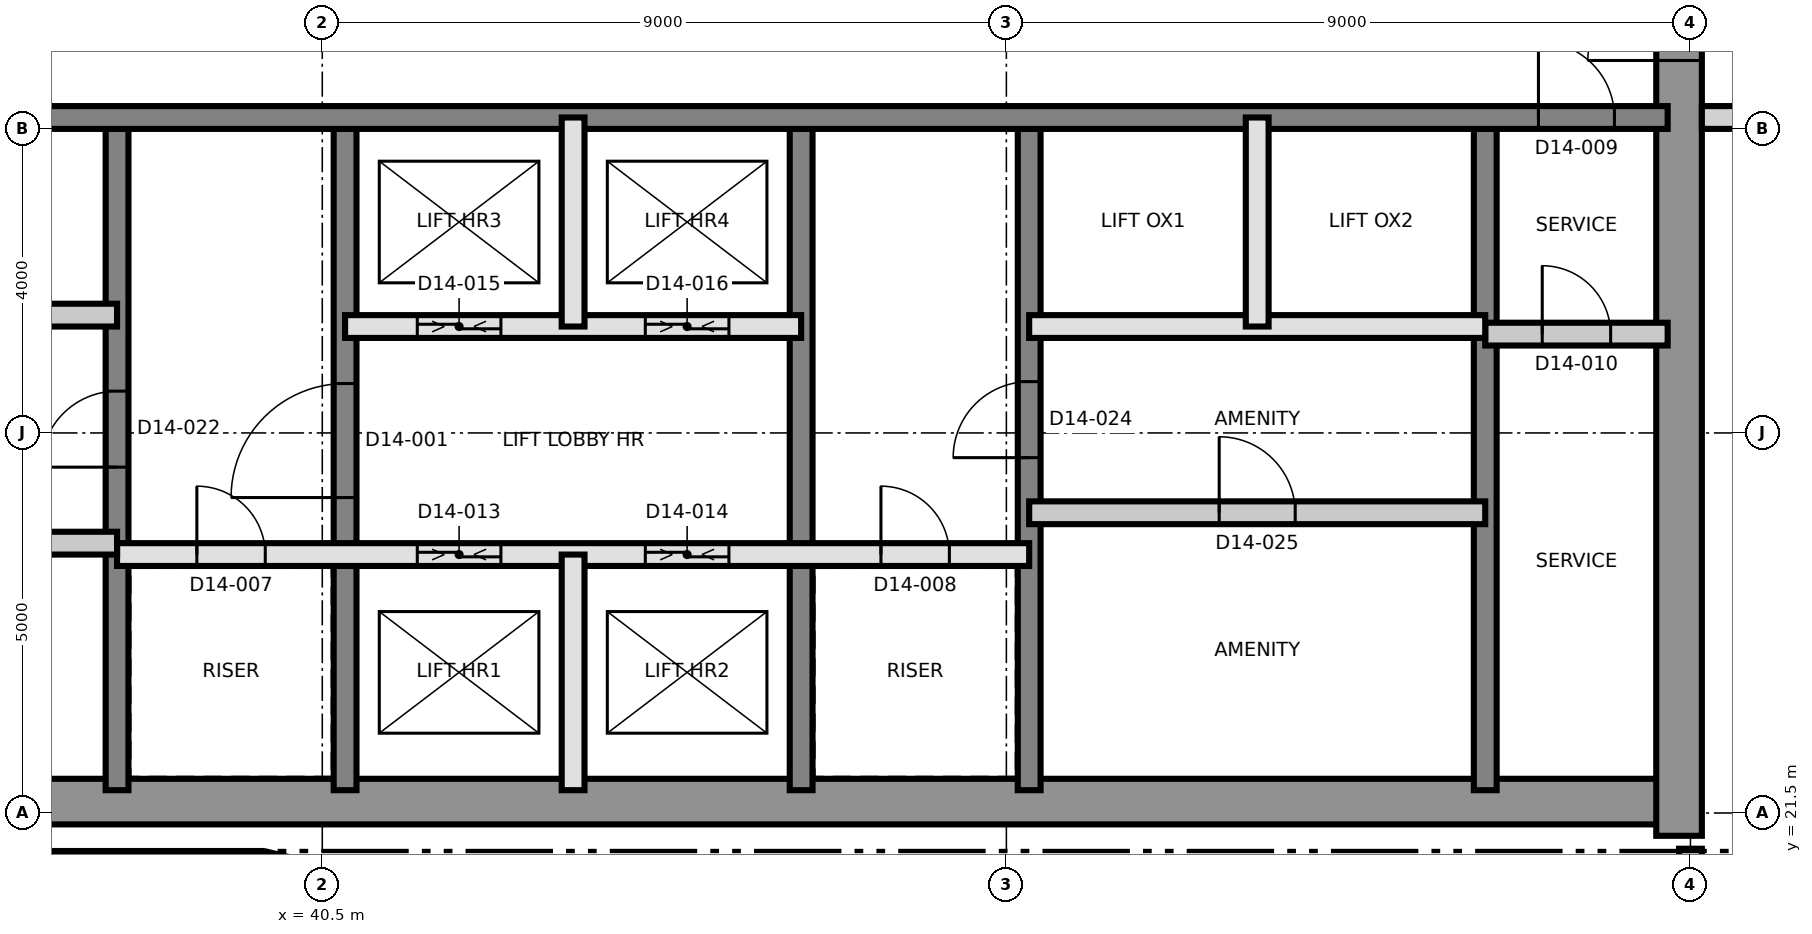
"""IFC4 building model, lengths in metres.
Left out: names, types, materials, properties, quantities, classifications, styles, units other than length and angle.
Written with IfcOpenShell. Run it as: python <this file> out.ifc"""

import sys

from ifc_helpers import new_model, si_unit, direction, frame, frame_2d, origin, place, context, subcontext, project, spatial, rectangle, extrude, element, fill, save


model = new_model("IFC4")
c1 = context("Model", 3, precision=1e-05, world=origin(), true_north=direction((0.0, 1.0)))
c2 = subcontext(c1, "Body", "Model", "MODEL_VIEW")
j1 = project(units=[si_unit("LENGTHUNIT", "METRE"), si_unit("PLANEANGLEUNIT", "RADIAN")], contexts=[c1])
p1 = place(None, origin())
s1 = spatial("IfcSite", under=j1, at=p1, CompositionType="ELEMENT")
p2 = place(p1, origin())
s2 = spatial("IfcBuilding", under=s1, at=p2, CompositionType="ELEMENT")
p3 = place(p2, frame((0.0, 0.0, 149.6)))
s3 = spatial("IfcBuildingStorey", under=s2, at=p3, CompositionType="ELEMENT", Elevation=149.6)
p4 = place(p3, frame((31.2, 21.65, 0.0), z_axis=(0.0, 0.0, 1.0), x_axis=(1.0, 0.0, 0.0)))
e1 = element("IfcWall", 1, at=p4, inside=s3, PredefinedType="SHEAR", context=c2, shape_type="SweptSolid", body=[
    extrude(rectangle(XDim=27.0, YDim=0.6, at=frame_2d((13.5, 0.0))), origin(), (0.0, 0.0, 1.0), 3.7),
])
p5 = place(p3, frame((58.35, 21.2, 0.0), z_axis=(0.0, 0.0, 1.0), x_axis=(0.0, 1.0, 0.0)))
e2 = element("IfcWall", 2, at=p5, inside=s3, PredefinedType="SHEAR", context=c2, shape_type="SweptSolid", body=[
    extrude(rectangle(XDim=18.6, YDim=0.6, at=frame_2d((9.3, 0.0))), origin(), (0.0, 0.0, 1.0), 3.7),
])
p6 = place(p5, frame((10.2, 0.0, 0.0)))
e3 = element("IfcOpeningElement", 3, at=p6, cuts=e2, PredefinedType="OPENING", context=c2, shape_type="SweptSolid", body=[
    extrude(rectangle(XDim=1.2, YDim=2.1, at=frame_2d((0.6, 1.05))), frame((0.0, 0.31, 0.0), z_axis=(0.0, -1.0, 0.0), x_axis=(1.0, 0.0, 0.0)), (0.0, 0.0, 1.0), 0.62),
])
p7 = place(p3, frame((37.8, 21.8, 0.0), z_axis=(0.0, 0.0, 1.0), x_axis=(0.0, 1.0, 0.0)))
e4 = element("IfcWall", 4, at=p7, inside=s3, PredefinedType="SHEAR", context=c2, shape_type="SweptSolid", body=[
    extrude(rectangle(XDim=8.7, YDim=0.3, at=frame_2d((4.35, 0.0))), origin(), (0.0, 0.0, 1.0), 3.7),
])
p8 = place(p7, frame((4.25, 0.0, 0.0)))
e5 = element("IfcOpeningElement", 5, at=p8, cuts=e4, PredefinedType="OPENING", context=c2, shape_type="SweptSolid", body=[
    extrude(rectangle(XDim=1.0, YDim=2.1, at=frame_2d((0.5, 1.05))), frame((0.0, 0.16, 0.0), z_axis=(0.0, -1.0, 0.0), x_axis=(1.0, 0.0, 0.0)), (0.0, 0.0, 1.0), 0.32),
])
p9 = place(p3, frame((40.8, 21.8, 0.0), z_axis=(0.0, 0.0, 1.0), x_axis=(0.0, 1.0, 0.0)))
e6 = element("IfcWall", 6, at=p9, inside=s3, PredefinedType="SHEAR", context=c2, shape_type="SweptSolid", body=[
    extrude(rectangle(XDim=8.7, YDim=0.3, at=frame_2d((4.35, 0.0))), origin(), (0.0, 0.0, 1.0), 3.7),
])
p10 = place(p9, frame((3.85, 0.0, 0.0)))
e7 = element("IfcOpeningElement", 7, at=p10, cuts=e6, PredefinedType="OPENING", context=c2, shape_type="SweptSolid", body=[
    extrude(rectangle(XDim=1.5, YDim=2.1, at=frame_2d((0.75, 1.05))), frame((0.0, 0.16, 0.0), z_axis=(0.0, -1.0, 0.0), x_axis=(1.0, 0.0, 0.0)), (0.0, 0.0, 1.0), 0.32),
])
p11 = place(p3, frame((46.8, 21.8, 0.0), z_axis=(0.0, 0.0, 1.0), x_axis=(0.0, 1.0, 0.0)))
e8 = element("IfcWall", 8, at=p11, inside=s3, PredefinedType="SHEAR", context=c2, shape_type="SweptSolid", body=[
    extrude(rectangle(XDim=8.7, YDim=0.3, at=frame_2d((4.35, 0.0))), origin(), (0.0, 0.0, 1.0), 3.7),
])
p12 = place(p3, frame((49.8, 21.8, 0.0), z_axis=(0.0, 0.0, 1.0), x_axis=(0.0, 1.0, 0.0)))
e9 = element("IfcWall", 9, at=p12, inside=s3, PredefinedType="SHEAR", context=c2, shape_type="SweptSolid", body=[
    extrude(rectangle(XDim=8.7, YDim=0.3, at=frame_2d((4.35, 0.0))), origin(), (0.0, 0.0, 1.0), 3.7),
])
p13 = place(p12, frame((4.375, 0.0, 0.0)))
e10 = element("IfcOpeningElement", 10, at=p13, cuts=e9, PredefinedType="OPENING", context=c2, shape_type="SweptSolid", body=[
    extrude(rectangle(XDim=1.0, YDim=2.1, at=frame_2d((0.5, 1.05))), frame((0.0, 0.16, 0.0), z_axis=(0.0, -1.0, 0.0), x_axis=(1.0, 0.0, 0.0)), (0.0, 0.0, 1.0), 0.32),
])
p14 = place(p3, frame((55.8, 21.8, 0.0), z_axis=(0.0, 0.0, 1.0), x_axis=(0.0, 1.0, 0.0)))
e11 = element("IfcWall", 11, at=p14, inside=s3, PredefinedType="SHEAR", context=c2, shape_type="SweptSolid", body=[
    extrude(rectangle(XDim=8.7, YDim=0.3, at=frame_2d((4.35, 0.0))), origin(), (0.0, 0.0, 1.0), 3.7),
])
p15 = place(p3, frame((31.8, 30.65, 0.0), z_axis=(0.0, 0.0, 1.0), x_axis=(1.0, 0.0, 0.0)))
e12 = element("IfcWall", 12, at=p15, inside=s3, PredefinedType="SHEAR", context=c2, shape_type="SweptSolid", body=[
    extrude(rectangle(XDim=26.4, YDim=0.3, at=frame_2d((13.2, 0.0))), origin(), (0.0, 0.0, 1.0), 3.7),
])
p16 = place(p15, frame((24.7, 0.0, 0.0)))
e13 = element("IfcOpeningElement", 13, at=p16, cuts=e12, PredefinedType="OPENING", context=c2, shape_type="SweptSolid", body=[
    extrude(rectangle(XDim=1.0, YDim=2.1, at=frame_2d((0.5, 1.05))), frame((0.0, 0.16, 0.0), z_axis=(0.0, -1.0, 0.0), x_axis=(1.0, 0.0, 0.0)), (0.0, 0.0, 1.0), 0.32),
])
p17 = place(p15, frame((4.0, 0.0, 0.0)))
e14 = element("IfcOpeningElement", 14, at=p17, cuts=e12, PredefinedType="OPENING", context=c2, shape_type="SweptSolid", body=[
    extrude(rectangle(XDim=1.0, YDim=2.1, at=frame_2d((0.5, 1.05))), frame((0.0, 0.16, 0.0), z_axis=(0.0, -1.0, 0.0), x_axis=(1.0, 0.0, 0.0)), (0.0, 0.0, 1.0), 0.32),
])
p18 = place(p3, frame((31.36, 20.85, 0.0), z_axis=(0.0, 0.0, 1.0), x_axis=(1.0, 0.0, 0.0)))
e15 = element("IfcWall", 15, at=p18, inside=s3, PredefinedType="SOLIDWALL", context=c2, shape_type="SweptSolid", body=[
    extrude(rectangle(XDim=8.34, YDim=0.3, at=frame_2d((4.17, 0.0))), origin(), (0.0, 0.0, 1.0), 3.4),
])
p19 = place(p3, frame((39.735, 20.846, 0.0), z_axis=(0.0, 0.0, 1.0), x_axis=(0.97206095595, -0.234728562212, 0.0)))
e16 = element("IfcWall", 16, at=p19, inside=s3, PredefinedType="SOLIDWALL", context=c2, shape_type="SweptSolid", body=[
    extrude(rectangle(XDim=2.35, YDim=0.3, at=frame_2d((1.175, 0.0))), origin(), (0.0, 0.0, 1.0), 3.4),
])
p20 = place(p3, frame((37.8, 24.9, 0.0), z_axis=(0.0, 0.0, 1.0), x_axis=(1.0, 0.0, 0.0)))
e17 = element("IfcWall", 17, at=p20, inside=s3, PredefinedType="SOLIDWALL", context=c2, shape_type="SweptSolid", body=[
    extrude(rectangle(XDim=12.0, YDim=0.3, at=frame_2d((6.0, 0.0))), origin(), (0.0, 0.0, 1.0), 3.4),
])
p21 = place(p20, frame((1.05, 0.0, 0.0)))
e18 = element("IfcOpeningElement", 18, at=p21, cuts=e17, PredefinedType="OPENING", context=c2, shape_type="SweptSolid", body=[
    extrude(rectangle(XDim=0.9, YDim=2.1, at=frame_2d((0.45, 1.05))), frame((0.0, 0.16, 0.0), z_axis=(0.0, -1.0, 0.0), x_axis=(1.0, 0.0, 0.0)), (0.0, 0.0, 1.0), 0.32),
])
p22 = place(p20, frame((10.05, 0.0, 0.0)))
e19 = element("IfcOpeningElement", 19, at=p22, cuts=e17, PredefinedType="OPENING", context=c2, shape_type="SweptSolid", body=[
    extrude(rectangle(XDim=0.9, YDim=2.1, at=frame_2d((0.45, 1.05))), frame((0.0, 0.16, 0.0), z_axis=(0.0, -1.0, 0.0), x_axis=(1.0, 0.0, 0.0)), (0.0, 0.0, 1.0), 0.32),
])
p23 = place(p20, frame((3.95, 0.0, 0.0)))
e20 = element("IfcOpeningElement", 20, at=p23, cuts=e17, PredefinedType="OPENING", context=c2, shape_type="SweptSolid", body=[
    extrude(rectangle(XDim=1.1, YDim=2.4, at=frame_2d((0.55, 1.2))), frame((0.0, 0.16, 0.0), z_axis=(0.0, -1.0, 0.0), x_axis=(1.0, 0.0, 0.0)), (0.0, 0.0, 1.0), 0.32),
])
p24 = place(p20, frame((6.95, 0.0, 0.0)))
e21 = element("IfcOpeningElement", 21, at=p24, cuts=e17, PredefinedType="OPENING", context=c2, shape_type="SweptSolid", body=[
    extrude(rectangle(XDim=1.1, YDim=2.4, at=frame_2d((0.55, 1.2))), frame((0.0, 0.16, 0.0), z_axis=(0.0, -1.0, 0.0), x_axis=(1.0, 0.0, 0.0)), (0.0, 0.0, 1.0), 0.32),
])
p25 = place(p3, frame((31.8, 25.05, 0.0), z_axis=(0.0, 0.0, 1.0), x_axis=(1.0, 0.0, 0.0)))
e22 = element("IfcWall", 22, at=p25, inside=s3, PredefinedType="PARTITIONING", context=c2, shape_type="SweptSolid", body=[
    extrude(rectangle(XDim=6.0, YDim=0.3, at=frame_2d((3.0, 0.0))), origin(), (0.0, 0.0, 1.0), 3.4),
])
p26 = place(p25, frame((2.5, 0.0, 0.0)))
e23 = element("IfcOpeningElement", 23, at=p26, cuts=e22, PredefinedType="OPENING", context=c2, shape_type="SweptSolid", body=[
    extrude(rectangle(XDim=1.0, YDim=2.1, at=frame_2d((0.5, 1.05))), frame((0.0, 0.16, 0.0), z_axis=(0.0, -1.0, 0.0), x_axis=(1.0, 0.0, 0.0)), (0.0, 0.0, 1.0), 0.32),
])
p27 = place(p3, frame((49.8, 25.45, 0.0), z_axis=(0.0, 0.0, 1.0), x_axis=(1.0, 0.0, 0.0)))
e24 = element("IfcWall", 24, at=p27, inside=s3, PredefinedType="PARTITIONING", context=c2, shape_type="SweptSolid", body=[
    extrude(rectangle(XDim=6.0, YDim=0.3, at=frame_2d((3.0, 0.0))), origin(), (0.0, 0.0, 1.0), 3.4),
])
p28 = place(p27, frame((2.5, 0.0, 0.0)))
e25 = element("IfcOpeningElement", 25, at=p28, cuts=e24, PredefinedType="OPENING", context=c2, shape_type="SweptSolid", body=[
    extrude(rectangle(XDim=1.0, YDim=2.1, at=frame_2d((0.5, 1.05))), frame((0.0, 0.16, 0.0), z_axis=(0.0, -1.0, 0.0), x_axis=(1.0, 0.0, 0.0)), (0.0, 0.0, 1.0), 0.32),
])
p29 = place(p3, frame((55.8, 27.8, 0.0), z_axis=(0.0, 0.0, 1.0), x_axis=(1.0, 0.0, 0.0)))
e26 = element("IfcWall", 26, at=p29, inside=s3, PredefinedType="PARTITIONING", context=c2, shape_type="SweptSolid", body=[
    extrude(rectangle(XDim=2.4, YDim=0.3, at=frame_2d((1.2, 0.0))), origin(), (0.0, 0.0, 1.0), 3.4),
])
p30 = place(p29, frame((0.75, 0.0, 0.0)))
e27 = element("IfcOpeningElement", 27, at=p30, cuts=e26, PredefinedType="OPENING", context=c2, shape_type="SweptSolid", body=[
    extrude(rectangle(XDim=0.9, YDim=2.1, at=frame_2d((0.45, 1.05))), frame((0.0, 0.16, 0.0), z_axis=(0.0, -1.0, 0.0), x_axis=(1.0, 0.0, 0.0)), (0.0, 0.0, 1.0), 0.32),
])
p31 = place(p3, frame((40.8, 27.9, 0.0), z_axis=(0.0, 0.0, 1.0), x_axis=(1.0, 0.0, 0.0)))
e28 = element("IfcWall", 28, at=p31, inside=s3, PredefinedType="SOLIDWALL", context=c2, shape_type="SweptSolid", body=[
    extrude(rectangle(XDim=6.0, YDim=0.3, at=frame_2d((3.0, 0.0))), origin(), (0.0, 0.0, 1.0), 3.4),
])
p32 = place(p31, frame((0.95, 0.0, 0.0)))
e29 = element("IfcOpeningElement", 29, at=p32, cuts=e28, PredefinedType="OPENING", context=c2, shape_type="SweptSolid", body=[
    extrude(rectangle(XDim=1.1, YDim=2.4, at=frame_2d((0.55, 1.2))), frame((0.0, 0.16, 0.0), z_axis=(0.0, -1.0, 0.0), x_axis=(1.0, 0.0, 0.0)), (0.0, 0.0, 1.0), 0.32),
])
p33 = place(p31, frame((3.95, 0.0, 0.0)))
e30 = element("IfcOpeningElement", 30, at=p33, cuts=e28, PredefinedType="OPENING", context=c2, shape_type="SweptSolid", body=[
    extrude(rectangle(XDim=1.1, YDim=2.4, at=frame_2d((0.55, 1.2))), frame((0.0, 0.16, 0.0), z_axis=(0.0, -1.0, 0.0), x_axis=(1.0, 0.0, 0.0)), (0.0, 0.0, 1.0), 0.32),
])
p34 = place(p3, frame((49.8, 27.9, 0.0), z_axis=(0.0, 0.0, 1.0), x_axis=(1.0, 0.0, 0.0)))
e31 = element("IfcWall", 31, at=p34, inside=s3, PredefinedType="SOLIDWALL", context=c2, shape_type="SweptSolid", body=[
    extrude(rectangle(XDim=6.0, YDim=0.3, at=frame_2d((3.0, 0.0))), origin(), (0.0, 0.0, 1.0), 3.4),
])
p35 = place(p3, frame((31.8, 28.05, 0.0), z_axis=(0.0, 0.0, 1.0), x_axis=(1.0, 0.0, 0.0)))
e32 = element("IfcWall", 32, at=p35, inside=s3, PredefinedType="PARTITIONING", context=c2, shape_type="SweptSolid", body=[
    extrude(rectangle(XDim=6.0, YDim=0.3, at=frame_2d((3.0, 0.0))), origin(), (0.0, 0.0, 1.0), 3.4),
])
p36 = place(p3, frame((43.8, 21.8, 0.0), z_axis=(0.0, 0.0, 1.0), x_axis=(0.0, 1.0, 0.0)))
e33 = element("IfcWall", 33, at=p36, inside=s3, PredefinedType="SOLIDWALL", context=c2, shape_type="SweptSolid", body=[
    extrude(rectangle(XDim=3.1, YDim=0.3, at=frame_2d((1.55, 0.0))), origin(), (0.0, 0.0, 1.0), 3.4),
])
for number, where, z_axis, x_axis in (
    (34, (43.8, 27.9, 0.0), (0.0, 0.0, 1.0), (0.0, 1.0, 0.0)),
    (35, (52.8, 27.9, 0.0), (0.0, 0.0, 1.0), (0.0, 1.0, 0.0)),
):
    element("IfcWall", number, at=place(p3, frame(where, z_axis=z_axis, x_axis=x_axis)), inside=s3, PredefinedType="SOLIDWALL", context=c2, shape_type="SweptSolid", body=[
        extrude(rectangle(XDim=2.75, YDim=0.3, at=frame_2d((1.375, 0.0))), origin(), (0.0, 0.0, 1.0), 3.4),
    ])
p37 = place(p3, frame((58.65, 30.65, 0.0), z_axis=(0.0, 0.0, 1.0), x_axis=(1.0, 0.0, 0.0)))
e36 = element("IfcWall", 36, at=p37, inside=s3, PredefinedType="PARTITIONING", context=c2, shape_type="SweptSolid", body=[
    extrude(rectangle(XDim=8.5, YDim=0.3, at=frame_2d((4.25, 0.0))), origin(), (0.0, 0.0, 1.0), 3.4),
])
p38 = place(p37, frame((0.8, 0.0, 0.0)))
e37 = element("IfcOpeningElement", 37, at=p38, cuts=e36, PredefinedType="OPENING", context=c2, shape_type="SweptSolid", body=[
    extrude(rectangle(XDim=1.0, YDim=2.1, at=frame_2d((0.5, 1.05))), frame((0.0, 0.16, 0.0), z_axis=(0.0, -1.0, 0.0), x_axis=(1.0, 0.0, 0.0)), (0.0, 0.0, 1.0), 0.32),
])
p39 = place(p37, frame((6.45, 0.0, 0.0)))
e38 = element("IfcOpeningElement", 38, at=p39, cuts=e36, PredefinedType="OPENING", context=c2, shape_type="SweptSolid", body=[
    extrude(rectangle(XDim=1.0, YDim=2.1, at=frame_2d((0.5, 1.05))), frame((0.0, 0.16, 0.0), z_axis=(0.0, -1.0, 0.0), x_axis=(1.0, 0.0, 0.0)), (0.0, 0.0, 1.0), 0.32),
])
p40 = place(p3, frame((58.5, 20.35, 0.0), z_axis=(0.0, 0.0, 1.0), x_axis=(0.0, 1.0, 0.0)))
e39 = element("IfcWall", 39, at=p40, inside=s3, PredefinedType="PARTITIONING", context=c2, shape_type="SweptSolid", body=[
    extrude(rectangle(XDim=0.68, YDim=0.3, at=frame_2d((0.34, 0.0))), origin(), (0.0, 0.0, 1.0), 3.35),
])
p41 = place(p10, origin())
e40 = element("IfcDoor", 40, at=p41, inside=s3, OperationType="SINGLE_SWING_RIGHT", PredefinedType="DOOR", context=c2, shape_type="SweptSolid", body=[
    extrude(rectangle(XDim=1.5, YDim=2.1, at=frame_2d((0.75, 1.05))), frame((0.0, 0.025, 0.0), z_axis=(0.0, -1.0, 0.0), x_axis=(1.0, 0.0, 0.0)), (0.0, 0.0, 1.0), 0.05),
])
fill(e7, e40)
p42 = place(p21, origin())
e41 = element("IfcDoor", 41, at=p42, inside=s3, OperationType="SINGLE_SWING_LEFT", PredefinedType="DOOR", context=c2, shape_type="SweptSolid", body=[
    extrude(rectangle(XDim=0.9, YDim=2.1, at=frame_2d((0.45, 1.05))), frame((0.0, 0.025, 0.0), z_axis=(0.0, -1.0, 0.0), x_axis=(1.0, 0.0, 0.0)), (0.0, 0.0, 1.0), 0.05),
])
fill(e18, e41)
p43 = place(p22, origin())
e42 = element("IfcDoor", 42, at=p43, inside=s3, OperationType="SINGLE_SWING_RIGHT", PredefinedType="DOOR", context=c2, shape_type="SweptSolid", body=[
    extrude(rectangle(XDim=0.9, YDim=2.1, at=frame_2d((0.45, 1.05))), frame((0.0, 0.025, 0.0), z_axis=(0.0, -1.0, 0.0), x_axis=(1.0, 0.0, 0.0)), (0.0, 0.0, 1.0), 0.05),
])
fill(e19, e42)
p44 = place(p16, origin())
e43 = element("IfcDoor", 43, at=p44, inside=s3, OperationType="SINGLE_SWING_LEFT", PredefinedType="DOOR", context=c2, shape_type="SweptSolid", body=[
    extrude(rectangle(XDim=1.0, YDim=2.1, at=frame_2d((0.5, 1.05))), frame((0.0, 0.025, 0.0), z_axis=(0.0, -1.0, 0.0), x_axis=(1.0, 0.0, 0.0)), (0.0, 0.0, 1.0), 0.05),
])
fill(e13, e43)
p45 = place(p30, origin())
e44 = element("IfcDoor", 44, at=p45, inside=s3, OperationType="SINGLE_SWING_RIGHT", PredefinedType="DOOR", context=c2, shape_type="SweptSolid", body=[
    extrude(rectangle(XDim=0.9, YDim=2.1, at=frame_2d((0.45, 1.05))), frame((0.0, 0.025, 0.0), z_axis=(0.0, -1.0, 0.0), x_axis=(1.0, 0.0, 0.0)), (0.0, 0.0, 1.0), 0.05),
])
fill(e27, e44)
p46 = place(p6, origin())
e45 = element("IfcDoor", 45, at=p46, inside=s3, OperationType="SINGLE_SWING_LEFT", PredefinedType="DOOR", context=c2, shape_type="SweptSolid", body=[
    extrude(rectangle(XDim=1.2, YDim=2.1, at=frame_2d((0.6, 1.05))), frame((0.0, 0.025, 0.0), z_axis=(0.0, -1.0, 0.0), x_axis=(1.0, 0.0, 0.0)), (0.0, 0.0, 1.0), 0.05),
])
fill(e3, e45)
p47 = place(p23, origin())
e46 = element("IfcDoor", 46, at=p47, inside=s3, OperationType="SLIDING_TO_LEFT", PredefinedType="DOOR", context=c2, shape_type="SweptSolid", body=[
    extrude(rectangle(XDim=1.1, YDim=2.4, at=frame_2d((0.55, 1.2))), frame((0.0, 0.025, 0.0), z_axis=(0.0, -1.0, 0.0), x_axis=(1.0, 0.0, 0.0)), (0.0, 0.0, 1.0), 0.05),
])
fill(e20, e46)
p48 = place(p24, origin())
e47 = element("IfcDoor", 47, at=p48, inside=s3, OperationType="SLIDING_TO_LEFT", PredefinedType="DOOR", context=c2, shape_type="SweptSolid", body=[
    extrude(rectangle(XDim=1.1, YDim=2.4, at=frame_2d((0.55, 1.2))), frame((0.0, 0.025, 0.0), z_axis=(0.0, -1.0, 0.0), x_axis=(1.0, 0.0, 0.0)), (0.0, 0.0, 1.0), 0.05),
])
fill(e21, e47)
p49 = place(p32, origin())
e48 = element("IfcDoor", 48, at=p49, inside=s3, OperationType="SLIDING_TO_LEFT", PredefinedType="DOOR", context=c2, shape_type="SweptSolid", body=[
    extrude(rectangle(XDim=1.1, YDim=2.4, at=frame_2d((0.55, 1.2))), frame((0.0, 0.025, 0.0), z_axis=(0.0, -1.0, 0.0), x_axis=(1.0, 0.0, 0.0)), (0.0, 0.0, 1.0), 0.05),
])
fill(e29, e48)
p50 = place(p33, origin())
e49 = element("IfcDoor", 49, at=p50, inside=s3, OperationType="SLIDING_TO_LEFT", PredefinedType="DOOR", context=c2, shape_type="SweptSolid", body=[
    extrude(rectangle(XDim=1.1, YDim=2.4, at=frame_2d((0.55, 1.2))), frame((0.0, 0.025, 0.0), z_axis=(0.0, -1.0, 0.0), x_axis=(1.0, 0.0, 0.0)), (0.0, 0.0, 1.0), 0.05),
])
fill(e30, e49)
p51 = place(p8, origin())
e50 = element("IfcDoor", 50, at=p51, inside=s3, OperationType="SINGLE_SWING_RIGHT", PredefinedType="DOOR", context=c2, shape_type="SweptSolid", body=[
    extrude(rectangle(XDim=1.0, YDim=2.1, at=frame_2d((0.5, 1.05))), frame((0.0, 0.025, 0.0), z_axis=(0.0, -1.0, 0.0), x_axis=(1.0, 0.0, 0.0)), (0.0, 0.0, 1.0), 0.05),
])
fill(e5, e50)
p52 = place(p13, origin())
e51 = element("IfcDoor", 51, at=p52, inside=s3, OperationType="SINGLE_SWING_RIGHT", PredefinedType="DOOR", context=c2, shape_type="SweptSolid", body=[
    extrude(rectangle(XDim=1.0, YDim=2.1, at=frame_2d((0.5, 1.05))), frame((0.0, 0.025, 0.0), z_axis=(0.0, -1.0, 0.0), x_axis=(1.0, 0.0, 0.0)), (0.0, 0.0, 1.0), 0.05),
])
fill(e10, e51)
p53 = place(p28, origin())
e52 = element("IfcDoor", 52, at=p53, inside=s3, OperationType="SINGLE_SWING_RIGHT", PredefinedType="DOOR", context=c2, shape_type="SweptSolid", body=[
    extrude(rectangle(XDim=1.0, YDim=2.1, at=frame_2d((0.5, 1.05))), frame((0.0, 0.025, 0.0), z_axis=(0.0, -1.0, 0.0), x_axis=(1.0, 0.0, 0.0)), (0.0, 0.0, 1.0), 0.05),
])
fill(e25, e52)
save(model, sys.argv[1])
